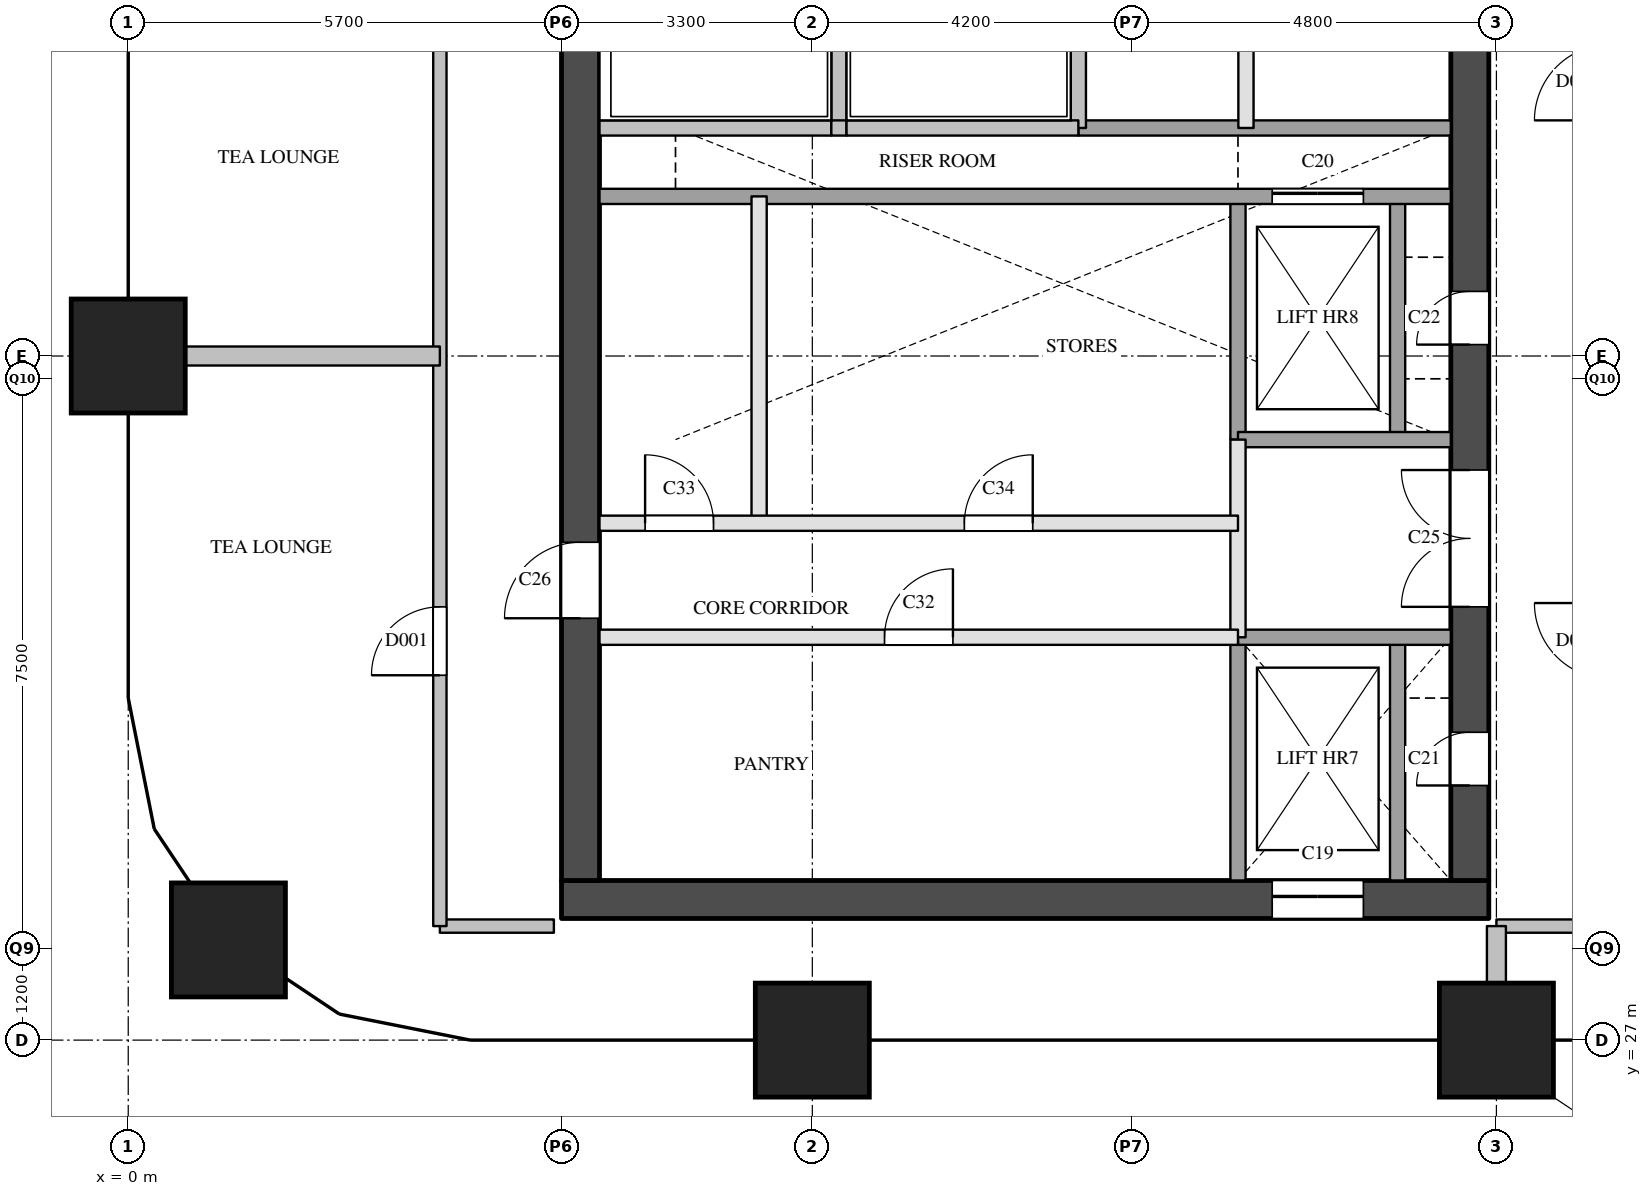
"""IFC4 building model, lengths in metres.
Left out: names, types, materials, properties, quantities, classifications, styles, units other than length and angle.
Written with IfcOpenShell. Run it as: python <this file> out.ifc"""

import sys

from ifc_helpers import new_model, si_unit, direction, frame, frame_2d, origin, origin_2d, place, context, subcontext, project, spatial, rectangle, extrude, element, fill, save


model = new_model("IFC4")
c1 = context("Model", 3, precision=1e-05, world=origin(), true_north=direction((0.0, 1.0)))
c2 = subcontext(c1, "Body", "Model", "MODEL_VIEW")
j1 = project(units=[si_unit("LENGTHUNIT", "METRE"), si_unit("PLANEANGLEUNIT", "RADIAN")], contexts=[c1])
p1 = place(None, origin())
s1 = spatial("IfcSite", under=j1, at=p1, CompositionType="ELEMENT")
p2 = place(p1, origin())
s2 = spatial("IfcBuilding", under=s1, at=p2, CompositionType="ELEMENT")
p3 = place(p2, frame((0.0, 0.0, 166.1)))
s3 = spatial("IfcBuildingStorey", under=s2, at=p3, CompositionType="ELEMENT", Elevation=166.1)
for number, where, z_axis, x_axis in (
    (1, (1.318, 28.318, 0.0), (0.0, 0.0, 1.0), (1.0, 0.0, 0.0)),
    (2, (0.0, 36.0, 0.0), (0.0, 0.0, 1.0), (1.0, 0.0, 0.0)),
    (3, (9.0, 27.0, 0.0), (0.0, 0.0, 1.0), (1.0, 0.0, 0.0)),
    (4, (18.0, 27.0, 0.0), (0.0, 0.0, 1.0), (1.0, 0.0, 0.0)),
):
    element("IfcColumn", number, at=place(p3, frame(where, z_axis=z_axis, x_axis=x_axis)), inside=s3, PredefinedType="COLUMN", context=c2, shape_type="SweptSolid", body=[
        extrude(rectangle(XDim=1.5, YDim=1.5, at=origin_2d()), origin(), (0.0, 0.0, 1.0), 3.9),
    ])
p4 = place(p3, frame((5.7, 28.85, 0.0), z_axis=(0.0, 0.0, 1.0), x_axis=(1.0, 0.0, 0.0)))
e5 = element("IfcWall", 5, at=p4, inside=s3, PredefinedType="SHEAR", context=c2, shape_type="SweptSolid", body=[
    extrude(rectangle(XDim=12.2, YDim=0.5, at=frame_2d((6.1, 0.0))), origin(), (0.0, 0.0, 1.0), 3.6),
])
p5 = place(p4, frame((9.35, 0.0, 0.0)))
e6 = element("IfcOpeningElement", 6, at=p5, cuts=e5, PredefinedType="OPENING", context=c2, shape_type="SweptSolid", body=[
    extrude(rectangle(XDim=1.2, YDim=2.1, at=frame_2d((0.6, 1.05))), frame((0.0, 0.26, 0.0), z_axis=(0.0, -1.0, 0.0), x_axis=(1.0, 0.0, 0.0)), (0.0, 0.0, 1.0), 0.52),
])
p6 = place(p3, frame((5.95, 29.1, 0.0), z_axis=(0.0, 0.0, 1.0), x_axis=(0.0, 1.0, 0.0)))
e7 = element("IfcWall", 7, at=p6, inside=s3, PredefinedType="SHEAR", context=c2, shape_type="SweptSolid", body=[
    extrude(rectangle(XDim=20.3, YDim=0.5, at=frame_2d((10.15, 0.0))), origin(), (0.0, 0.0, 1.0), 3.6),
])
p7 = place(p6, frame((3.45, 0.0, 0.0)))
e8 = element("IfcOpeningElement", 8, at=p7, cuts=e7, PredefinedType="OPENING", context=c2, shape_type="SweptSolid", body=[
    extrude(rectangle(XDim=1.0, YDim=2.1, at=frame_2d((0.5, 1.05))), frame((0.0, 0.26, 0.0), z_axis=(0.0, -1.0, 0.0), x_axis=(1.0, 0.0, 0.0)), (0.0, 0.0, 1.0), 0.52),
])
p8 = place(p6, frame((16.4, 0.0, 0.0)))
e9 = element("IfcOpeningElement", 9, at=p8, cuts=e7, PredefinedType="OPENING", context=c2, shape_type="SweptSolid", body=[
    extrude(rectangle(XDim=1.0, YDim=2.1, at=frame_2d((0.5, 1.05))), frame((0.0, 0.26, 0.0), z_axis=(0.0, -1.0, 0.0), x_axis=(1.0, 0.0, 0.0)), (0.0, 0.0, 1.0), 0.52),
])
p9 = place(p3, frame((17.65, 29.1, 0.0), z_axis=(0.0, 0.0, 1.0), x_axis=(0.0, 1.0, 0.0)))
e10 = element("IfcWall", 10, at=p9, inside=s3, PredefinedType="SHEAR", context=c2, shape_type="SweptSolid", body=[
    extrude(rectangle(XDim=20.3, YDim=0.5, at=frame_2d((10.15, 0.0))), origin(), (0.0, 0.0, 1.0), 3.6),
])
p10 = place(p9, frame((1.25, 0.0, 0.0)))
e11 = element("IfcOpeningElement", 11, at=p10, cuts=e10, PredefinedType="OPENING", context=c2, shape_type="SweptSolid", body=[
    extrude(rectangle(XDim=0.7, YDim=2.1, at=frame_2d((0.35, 1.05))), frame((0.0, 0.26, 0.0), z_axis=(0.0, -1.0, 0.0), x_axis=(1.0, 0.0, 0.0)), (0.0, 0.0, 1.0), 0.52),
])
p11 = place(p9, frame((7.05, 0.0, 0.0)))
e12 = element("IfcOpeningElement", 12, at=p11, cuts=e10, PredefinedType="OPENING", context=c2, shape_type="SweptSolid", body=[
    extrude(rectangle(XDim=0.7, YDim=2.1, at=frame_2d((0.35, 1.05))), frame((0.0, 0.26, 0.0), z_axis=(0.0, -1.0, 0.0), x_axis=(1.0, 0.0, 0.0)), (0.0, 0.0, 1.0), 0.52),
])
p12 = place(p9, frame((3.6, 0.0, 0.0)))
e13 = element("IfcOpeningElement", 13, at=p12, cuts=e10, PredefinedType="OPENING", context=c2, shape_type="SweptSolid", body=[
    extrude(rectangle(XDim=1.8, YDim=2.1, at=frame_2d((0.9, 1.05))), frame((0.0, 0.26, 0.0), z_axis=(0.0, -1.0, 0.0), x_axis=(1.0, 0.0, 0.0)), (0.0, 0.0, 1.0), 0.52),
])
p13 = place(p3, frame((8.3, 33.8, 0.0), z_axis=(0.0, 0.0, 1.0), x_axis=(0.0, 1.0, 0.0)))
e14 = element("IfcWall", 14, at=p13, inside=s3, PredefinedType="PARTITIONING", context=c2, shape_type="SweptSolid", body=[
    extrude(rectangle(XDim=4.3, YDim=0.2, at=frame_2d((2.15, 0.0))), origin(), (0.0, 0.0, 1.0), 3.6),
])
for number, where, z_axis, x_axis in (
    (15, (9.35, 39.0, 0.0), (0.0, 0.0, 1.0), (0.0, 1.0, 0.0)),
    (16, (12.5, 39.0, 0.0), (0.0, 0.0, 1.0), (0.0, 1.0, 0.0)),
):
    element("IfcWall", number, at=place(p3, frame(where, z_axis=z_axis, x_axis=x_axis)), inside=s3, PredefinedType="SOLIDWALL", context=c2, shape_type="SweptSolid", body=[
        extrude(rectangle(XDim=1.9, YDim=0.2, at=frame_2d((0.95, 0.0))), origin(), (0.0, 0.0, 1.0), 3.6),
    ])
p14 = place(p3, frame((14.6, 32.3, 0.0), z_axis=(0.0, 0.0, 1.0), x_axis=(0.0, 1.0, 0.0)))
e17 = element("IfcWall", 17, at=p14, inside=s3, PredefinedType="PARTITIONING", context=c2, shape_type="SweptSolid", body=[
    extrude(rectangle(XDim=2.6, YDim=0.2, at=frame_2d((1.3, 0.0))), origin(), (0.0, 0.0, 1.0), 3.6),
])
p15 = place(p3, frame((14.6, 29.1, 0.0), z_axis=(0.0, 0.0, 1.0), x_axis=(0.0, 1.0, 0.0)))
e18 = element("IfcWall", 18, at=p15, inside=s3, PredefinedType="SOLIDWALL", context=c2, shape_type="SweptSolid", body=[
    extrude(rectangle(XDim=3.2, YDim=0.2, at=frame_2d((1.6, 0.0))), origin(), (0.0, 0.0, 1.0), 3.6),
])
p16 = place(p3, frame((14.6, 34.9, 0.0), z_axis=(0.0, 0.0, 1.0), x_axis=(0.0, 1.0, 0.0)))
e19 = element("IfcWall", 19, at=p16, inside=s3, PredefinedType="SOLIDWALL", context=c2, shape_type="SweptSolid", body=[
    extrude(rectangle(XDim=3.2, YDim=0.2, at=frame_2d((1.6, 0.0))), origin(), (0.0, 0.0, 1.0), 3.6),
])
p17 = place(p3, frame((14.705, 39.0, 0.0), z_axis=(0.0, 0.0, 1.0), x_axis=(0.0, 1.0, 0.0)))
e20 = element("IfcWall", 20, at=p17, inside=s3, PredefinedType="PARTITIONING", context=c2, shape_type="SweptSolid", body=[
    extrude(rectangle(XDim=6.2, YDim=0.2, at=frame_2d((3.1, 0.0))), origin(), (0.0, 0.0, 1.0), 3.6),
])
p18 = place(p3, frame((16.7, 29.1, 0.0), z_axis=(0.0, 0.0, 1.0), x_axis=(0.0, 1.0, 0.0)))
e21 = element("IfcWall", 21, at=p18, inside=s3, PredefinedType="SOLIDWALL", context=c2, shape_type="SweptSolid", body=[
    extrude(rectangle(XDim=3.2, YDim=0.2, at=frame_2d((1.6, 0.0))), origin(), (0.0, 0.0, 1.0), 3.6),
])
p19 = place(p3, frame((16.7, 34.9, 0.0), z_axis=(0.0, 0.0, 1.0), x_axis=(0.0, 1.0, 0.0)))
e22 = element("IfcWall", 22, at=p19, inside=s3, PredefinedType="SOLIDWALL", context=c2, shape_type="SweptSolid", body=[
    extrude(rectangle(XDim=3.2, YDim=0.2, at=frame_2d((1.6, 0.0))), origin(), (0.0, 0.0, 1.0), 3.6),
])
p20 = place(p3, frame((6.2, 32.3, 0.0), z_axis=(0.0, 0.0, 1.0), x_axis=(1.0, 0.0, 0.0)))
e23 = element("IfcWall", 23, at=p20, inside=s3, PredefinedType="PARTITIONING", context=c2, shape_type="SweptSolid", body=[
    extrude(rectangle(XDim=8.4, YDim=0.2, at=frame_2d((4.2, 0.0))), origin(), (0.0, 0.0, 1.0), 3.6),
])
p21 = place(p20, frame((3.75, 0.0, 0.0)))
e24 = element("IfcOpeningElement", 24, at=p21, cuts=e23, PredefinedType="OPENING", context=c2, shape_type="SweptSolid", body=[
    extrude(rectangle(XDim=0.9, YDim=2.1, at=frame_2d((0.45, 1.05))), frame((0.0, 0.11, 0.0), z_axis=(0.0, -1.0, 0.0), x_axis=(1.0, 0.0, 0.0)), (0.0, 0.0, 1.0), 0.22),
])
p22 = place(p3, frame((14.6, 32.3, 0.0), z_axis=(0.0, 0.0, 1.0), x_axis=(1.0, 0.0, 0.0)))
e25 = element("IfcWall", 25, at=p22, inside=s3, PredefinedType="SOLIDWALL", context=c2, shape_type="SweptSolid", body=[
    extrude(rectangle(XDim=2.8, YDim=0.2, at=frame_2d((1.4, 0.0))), origin(), (0.0, 0.0, 1.0), 3.6),
])
p23 = place(p3, frame((6.2, 33.8, 0.0), z_axis=(0.0, 0.0, 1.0), x_axis=(1.0, 0.0, 0.0)))
e26 = element("IfcWall", 26, at=p23, inside=s3, PredefinedType="PARTITIONING", context=c2, shape_type="SweptSolid", body=[
    extrude(rectangle(XDim=8.4, YDim=0.2, at=frame_2d((4.2, 0.0))), origin(), (0.0, 0.0, 1.0), 3.6),
])
p24 = place(p23, frame((0.6, 0.0, 0.0)))
e27 = element("IfcOpeningElement", 27, at=p24, cuts=e26, PredefinedType="OPENING", context=c2, shape_type="SweptSolid", body=[
    extrude(rectangle(XDim=0.9, YDim=2.1, at=frame_2d((0.45, 1.05))), frame((0.0, 0.11, 0.0), z_axis=(0.0, -1.0, 0.0), x_axis=(1.0, 0.0, 0.0)), (0.0, 0.0, 1.0), 0.22),
])
p25 = place(p23, frame((4.8, 0.0, 0.0)))
e28 = element("IfcOpeningElement", 28, at=p25, cuts=e26, PredefinedType="OPENING", context=c2, shape_type="SweptSolid", body=[
    extrude(rectangle(XDim=0.9, YDim=2.1, at=frame_2d((0.45, 1.05))), frame((0.0, 0.11, 0.0), z_axis=(0.0, -1.0, 0.0), x_axis=(1.0, 0.0, 0.0)), (0.0, 0.0, 1.0), 0.22),
])
p26 = place(p3, frame((14.6, 34.9, 0.0), z_axis=(0.0, 0.0, 1.0), x_axis=(1.0, 0.0, 0.0)))
e29 = element("IfcWall", 29, at=p26, inside=s3, PredefinedType="SOLIDWALL", context=c2, shape_type="SweptSolid", body=[
    extrude(rectangle(XDim=2.8, YDim=0.2, at=frame_2d((1.4, 0.0))), origin(), (0.0, 0.0, 1.0), 3.6),
])
p27 = place(p3, frame((6.2, 38.1, 0.0), z_axis=(0.0, 0.0, 1.0), x_axis=(1.0, 0.0, 0.0)))
e30 = element("IfcWall", 30, at=p27, inside=s3, PredefinedType="SOLIDWALL", context=c2, shape_type="SweptSolid", body=[
    extrude(rectangle(XDim=11.2, YDim=0.2, at=frame_2d((5.6, 0.0))), origin(), (0.0, 0.0, 1.0), 3.6),
])
p28 = place(p27, frame((8.85, 0.0, 0.0)))
e31 = element("IfcOpeningElement", 31, at=p28, cuts=e30, PredefinedType="OPENING", context=c2, shape_type="SweptSolid", body=[
    extrude(rectangle(XDim=1.2, YDim=2.1, at=frame_2d((0.6, 1.05))), frame((0.0, 0.11, 0.0), z_axis=(0.0, -1.0, 0.0), x_axis=(1.0, 0.0, 0.0)), (0.0, 0.0, 1.0), 0.22),
])
p29 = place(p3, frame((12.5, 39.0, 0.0), z_axis=(0.0, 0.0, 1.0), x_axis=(1.0, 0.0, 0.0)))
e32 = element("IfcWall", 32, at=p29, inside=s3, PredefinedType="SOLIDWALL", context=c2, shape_type="SweptSolid", body=[
    extrude(rectangle(XDim=4.9, YDim=0.2, at=frame_2d((2.45, 0.0))), origin(), (0.0, 0.0, 1.0), 3.6),
])
p30 = place(p3, frame((6.2, 39.0, 0.0), z_axis=(0.0, 0.0, 1.0), x_axis=(1.0, 0.0, 0.0)))
e33 = element("IfcWall", 33, at=p30, inside=s3, PredefinedType="SOLIDWALL", context=c2, shape_type="SweptSolid", body=[
    extrude(rectangle(XDim=3.05, YDim=0.2, at=frame_2d((1.525, 0.0))), origin(), (0.0, 0.0, 1.0), 3.6),
])
p31 = place(p3, frame((9.25, 39.0, 0.0), z_axis=(0.0, 0.0, 1.0), x_axis=(1.0, 0.0, 0.0)))
e34 = element("IfcWall", 34, at=p31, inside=s3, PredefinedType="SOLIDWALL", context=c2, shape_type="SweptSolid", body=[
    extrude(rectangle(XDim=0.2, YDim=0.2, at=frame_2d((0.1, 0.0))), origin(), (0.0, 0.0, 1.0), 3.6),
])
p32 = place(p3, frame((9.45, 39.0, 0.0), z_axis=(0.0, 0.0, 1.0), x_axis=(1.0, 0.0, 0.0)))
e35 = element("IfcWall", 35, at=p32, inside=s3, PredefinedType="SOLIDWALL", context=c2, shape_type="SweptSolid", body=[
    extrude(rectangle(XDim=3.05, YDim=0.2, at=frame_2d((1.525, 0.0))), origin(), (0.0, 0.0, 1.0), 3.6),
])
for number, where, z_axis, x_axis in (
    (36, (4.1, 28.5, 0.0), (0.0, 0.0, 1.0), (1.0, 0.0, 0.0)),
    (37, (18.0, 28.5, 0.0), (0.0, 0.0, 1.0), (1.0, 0.0, 0.0)),
):
    element("IfcWall", number, at=place(p3, frame(where, z_axis=z_axis, x_axis=x_axis)), inside=s3, PredefinedType="PARTITIONING", context=c2, shape_type="SweptSolid", body=[
        extrude(rectangle(XDim=1.5, YDim=0.175, at=frame_2d((0.75, 0.0))), origin(), (0.0, 0.0, 1.0), 3.6),
    ])
p33 = place(p3, frame((4.1, 28.5, 0.0), z_axis=(0.0, 0.0, 1.0), x_axis=(0.0, 1.0, 0.0)))
e38 = element("IfcWall", 38, at=p33, inside=s3, PredefinedType="PARTITIONING", context=c2, shape_type="SweptSolid", body=[
    extrude(rectangle(XDim=23.0, YDim=0.175, at=frame_2d((11.5, 0.0))), origin(), (0.0, 0.0, 1.0), 3.6),
])
p34 = place(p33, frame((3.3, 0.0, 0.0)))
e39 = element("IfcOpeningElement", 39, at=p34, cuts=e38, PredefinedType="OPENING", context=c2, shape_type="SweptSolid", body=[
    extrude(rectangle(XDim=0.9, YDim=2.1, at=frame_2d((0.45, 1.05))), frame((0.0, 0.097, 0.0), z_axis=(0.0, -1.0, 0.0), x_axis=(1.0, 0.0, 0.0)), (0.0, 0.0, 1.0), 0.195),
])
p35 = place(p33, frame((12.45, 0.0, 0.0)))
e40 = element("IfcOpeningElement", 40, at=p35, cuts=e38, PredefinedType="OPENING", context=c2, shape_type="SweptSolid", body=[
    extrude(rectangle(XDim=0.9, YDim=2.1, at=frame_2d((0.45, 1.05))), frame((0.0, 0.097, 0.0), z_axis=(0.0, -1.0, 0.0), x_axis=(1.0, 0.0, 0.0)), (0.0, 0.0, 1.0), 0.195),
])
p36 = place(p3, frame((0.0, 36.0, 0.0), z_axis=(0.0, 0.0, 1.0), x_axis=(1.0, 0.0, 0.0)))
e41 = element("IfcWall", 41, at=p36, inside=s3, PredefinedType="PARTITIONING", context=c2, shape_type="SweptSolid", body=[
    extrude(rectangle(XDim=4.1, YDim=0.25, at=frame_2d((2.05, 0.0))), origin(), (0.0, 0.0, 1.0), 3.6),
])
p37 = place(p3, frame((18.0, 27.0, 0.0), z_axis=(0.0, 0.0, 1.0), x_axis=(0.0, 1.0, 0.0)))
e42 = element("IfcWall", 42, at=p37, inside=s3, PredefinedType="PARTITIONING", context=c2, shape_type="SweptSolid", body=[
    extrude(rectangle(XDim=1.5, YDim=0.25, at=frame_2d((0.75, 0.0))), origin(), (0.0, 0.0, 1.0), 3.6),
])
p38 = place(p5, origin())
e43 = element("IfcDoor", 43, at=p38, inside=s3, OperationType="SLIDING_TO_LEFT", PredefinedType="DOOR", context=c2, shape_type="SweptSolid", body=[
    extrude(rectangle(XDim=1.2, YDim=2.1, at=frame_2d((0.6, 1.05))), frame((0.0, 0.025, 0.0), z_axis=(0.0, -1.0, 0.0), x_axis=(1.0, 0.0, 0.0)), (0.0, 0.0, 1.0), 0.05),
])
fill(e6, e43)
p39 = place(p28, origin())
e44 = element("IfcDoor", 44, at=p39, inside=s3, OperationType="SLIDING_TO_LEFT", PredefinedType="DOOR", context=c2, shape_type="SweptSolid", body=[
    extrude(rectangle(XDim=1.2, YDim=2.1, at=frame_2d((0.6, 1.05))), frame((0.0, 0.025, 0.0), z_axis=(0.0, -1.0, 0.0), x_axis=(1.0, 0.0, 0.0)), (0.0, 0.0, 1.0), 0.05),
])
fill(e31, e44)
p40 = place(p10, origin())
e45 = element("IfcDoor", 45, at=p40, inside=s3, OperationType="SINGLE_SWING_LEFT", PredefinedType="DOOR", context=c2, shape_type="SweptSolid", body=[
    extrude(rectangle(XDim=0.7, YDim=2.1, at=frame_2d((0.35, 1.05))), frame((0.0, 0.025, 0.0), z_axis=(0.0, -1.0, 0.0), x_axis=(1.0, 0.0, 0.0)), (0.0, 0.0, 1.0), 0.05),
])
fill(e11, e45)
p41 = place(p11, origin())
e46 = element("IfcDoor", 46, at=p41, inside=s3, OperationType="SINGLE_SWING_LEFT", PredefinedType="DOOR", context=c2, shape_type="SweptSolid", body=[
    extrude(rectangle(XDim=0.7, YDim=2.1, at=frame_2d((0.35, 1.05))), frame((0.0, 0.025, 0.0), z_axis=(0.0, -1.0, 0.0), x_axis=(1.0, 0.0, 0.0)), (0.0, 0.0, 1.0), 0.05),
])
fill(e12, e46)
p42 = place(p12, origin())
e47 = element("IfcDoor", 47, at=p42, inside=s3, OperationType="DOUBLE_DOOR_SINGLE_SWING", PredefinedType="DOOR", context=c2, shape_type="SweptSolid", body=[
    extrude(rectangle(XDim=1.8, YDim=2.1, at=frame_2d((0.9, 1.05))), frame((0.0, 0.025, 0.0), z_axis=(0.0, -1.0, 0.0), x_axis=(1.0, 0.0, 0.0)), (0.0, 0.0, 1.0), 0.05),
])
fill(e13, e47)
p43 = place(p7, origin())
e48 = element("IfcDoor", 48, at=p43, inside=s3, OperationType="SINGLE_SWING_LEFT", PredefinedType="DOOR", context=c2, shape_type="SweptSolid", body=[
    extrude(rectangle(XDim=1.0, YDim=2.1, at=frame_2d((0.5, 1.05))), frame((0.0, 0.025, 0.0), z_axis=(0.0, -1.0, 0.0), x_axis=(1.0, 0.0, 0.0)), (0.0, 0.0, 1.0), 0.05),
])
fill(e8, e48)
p44 = place(p21, origin())
e49 = element("IfcDoor", 49, at=p44, inside=s3, OperationType="SINGLE_SWING_RIGHT", PredefinedType="DOOR", context=c2, shape_type="SweptSolid", body=[
    extrude(rectangle(XDim=0.9, YDim=2.1, at=frame_2d((0.45, 1.05))), frame((0.0, 0.025, 0.0), z_axis=(0.0, -1.0, 0.0), x_axis=(1.0, 0.0, 0.0)), (0.0, 0.0, 1.0), 0.05),
])
fill(e24, e49)
p45 = place(p24, origin())
e50 = element("IfcDoor", 50, at=p45, inside=s3, OperationType="SINGLE_SWING_LEFT", PredefinedType="DOOR", context=c2, shape_type="SweptSolid", body=[
    extrude(rectangle(XDim=0.9, YDim=2.1, at=frame_2d((0.45, 1.05))), frame((0.0, 0.025, 0.0), z_axis=(0.0, -1.0, 0.0), x_axis=(1.0, 0.0, 0.0)), (0.0, 0.0, 1.0), 0.05),
])
fill(e27, e50)
p46 = place(p25, origin())
e51 = element("IfcDoor", 51, at=p46, inside=s3, OperationType="SINGLE_SWING_RIGHT", PredefinedType="DOOR", context=c2, shape_type="SweptSolid", body=[
    extrude(rectangle(XDim=0.9, YDim=2.1, at=frame_2d((0.45, 1.05))), frame((0.0, 0.025, 0.0), z_axis=(0.0, -1.0, 0.0), x_axis=(1.0, 0.0, 0.0)), (0.0, 0.0, 1.0), 0.05),
])
fill(e28, e51)
p47 = place(p34, origin())
e52 = element("IfcDoor", 52, at=p47, inside=s3, OperationType="SINGLE_SWING_LEFT", PredefinedType="DOOR", context=c2, shape_type="SweptSolid", body=[
    extrude(rectangle(XDim=0.9, YDim=2.1, at=frame_2d((0.45, 1.05))), frame((0.0, 0.025, 0.0), z_axis=(0.0, -1.0, 0.0), x_axis=(1.0, 0.0, 0.0)), (0.0, 0.0, 1.0), 0.05),
])
fill(e39, e52)
save(model, sys.argv[1])
